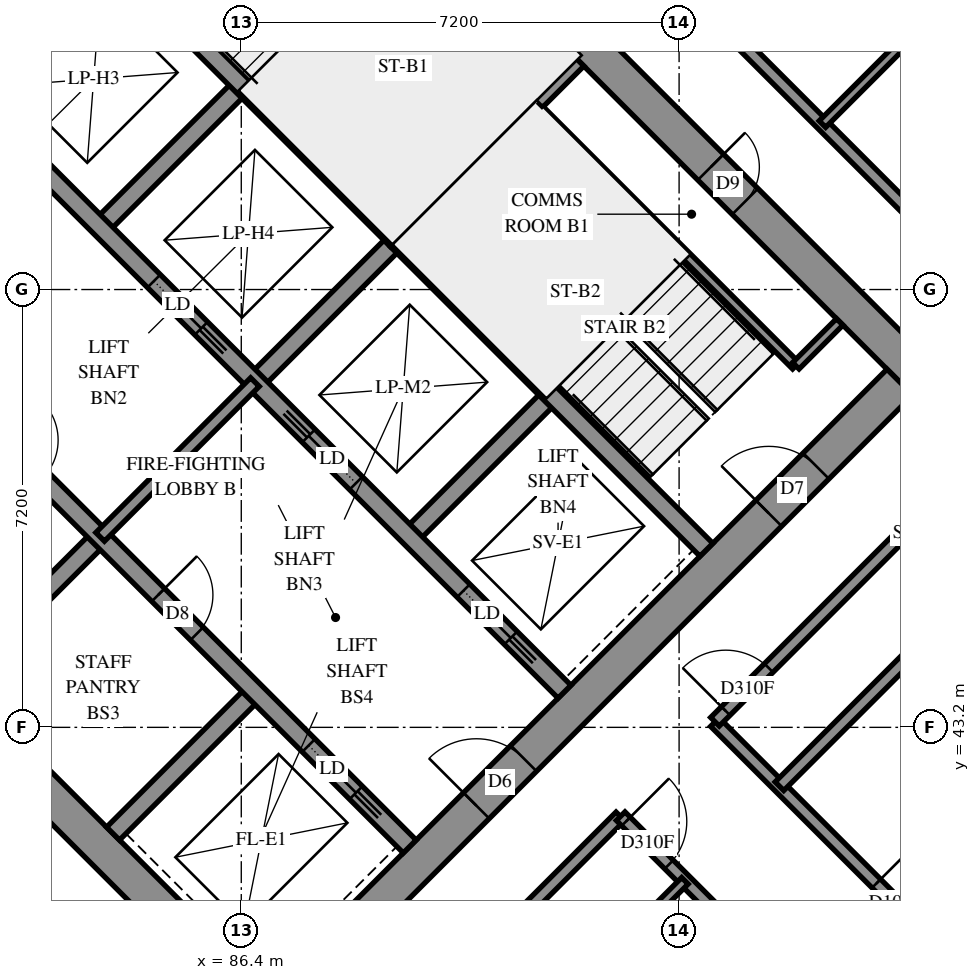
"""IFC4 building model, lengths in metres.
Left out: names, types, materials, properties, quantities, classifications, styles, units other than length and angle.
Written with IfcOpenShell. Run it as: python <this file> out.ifc"""

import sys

from ifc_helpers import new_model, si_unit, direction, frame, frame_2d, origin, place, context, subcontext, project, spatial, rectangle, extrude, element, fill, save


model = new_model("IFC4")
c1 = context("Model", 3, precision=1e-05, world=origin(), true_north=direction((0.0, 1.0)))
c2 = subcontext(c1, "Body", "Model", "MODEL_VIEW")
j1 = project(units=[si_unit("LENGTHUNIT", "METRE"), si_unit("PLANEANGLEUNIT", "RADIAN")], contexts=[c1])
p1 = place(None, origin())
s1 = spatial("IfcSite", under=j1, at=p1, CompositionType="ELEMENT")
p2 = place(p1, origin())
s2 = spatial("IfcBuilding", under=s1, at=p2, CompositionType="ELEMENT")
p3 = place(p2, frame((0.0, 0.0, 152.4)))
s3 = spatial("IfcBuildingStorey", under=s2, at=p3, CompositionType="ELEMENT", Elevation=152.4)
p4 = place(p3, frame((76.018, 49.302, -0.3), z_axis=(0.0, 0.0, 1.0), x_axis=(0.7071067812, -0.7071067812, 0.0)))
e1 = element("IfcWall", 1, at=p4, inside=s3, PredefinedType="SHEAR", context=c2, shape_type="SweptSolid", body=[
    extrude(rectangle(XDim=15.6, YDim=0.6, at=frame_2d((7.8, 0.0))), origin(), (0.0, 0.0, 1.0), 2.7),
])
p5 = place(p3, frame((86.625, 59.908, -0.3), z_axis=(0.0, 0.0, 1.0), x_axis=(0.7071067812, -0.7071067812, 0.0)))
e2 = element("IfcWall", 2, at=p5, inside=s3, PredefinedType="SHEAR", context=c2, shape_type="SweptSolid", body=[
    extrude(rectangle(XDim=15.6, YDim=0.6, at=frame_2d((7.8, 0.0))), origin(), (0.0, 0.0, 1.0), 2.7),
])
p6 = place(p5, frame((10.6, 0.0, 0.3)))
e3 = element("IfcOpeningElement", 3, at=p6, cuts=e2, PredefinedType="OPENING", context=c2, shape_type="SweptSolid", body=[
    extrude(rectangle(XDim=0.8, YDim=2.1, at=frame_2d((0.4, 1.05))), frame((0.0, 0.31, 0.0), z_axis=(0.0, -1.0, 0.0), x_axis=(1.0, 0.0, 0.0)), (0.0, 0.0, 1.0), 0.62),
])
p7 = place(p3, frame((76.442, 49.302, -0.3), z_axis=(0.0, 0.0, 1.0), x_axis=(0.7071067812, 0.7071067812, 0.0)))
e4 = element("IfcWall", 4, at=p7, inside=s3, PredefinedType="SHEAR", context=c2, shape_type="SweptSolid", body=[
    extrude(rectangle(XDim=14.4, YDim=0.6, at=frame_2d((7.2, 0.0))), origin(), (0.0, 0.0, 1.0), 2.7),
])
p8 = place(p7, frame((4.55, 0.0, 0.3)))
e5 = element("IfcOpeningElement", 5, at=p8, cuts=e4, PredefinedType="OPENING", context=c2, shape_type="SweptSolid", body=[
    extrude(rectangle(XDim=1.1, YDim=2.1, at=frame_2d((0.55, 1.05))), frame((0.0, 0.31, 0.0), z_axis=(0.0, -1.0, 0.0), x_axis=(1.0, 0.0, 0.0)), (0.0, 0.0, 1.0), 0.62),
])
p9 = place(p7, frame((11.35, 0.0, 0.3)))
e6 = element("IfcOpeningElement", 6, at=p9, cuts=e4, PredefinedType="OPENING", context=c2, shape_type="SweptSolid", body=[
    extrude(rectangle(XDim=1.1, YDim=2.1, at=frame_2d((0.55, 1.05))), frame((0.0, 0.31, 0.0), z_axis=(0.0, -1.0, 0.0), x_axis=(1.0, 0.0, 0.0)), (0.0, 0.0, 1.0), 0.62),
])
p10 = place(p3, frame((87.049, 38.695, -0.3), z_axis=(0.0, 0.0, 1.0), x_axis=(0.7071067812, 0.7071067812, 0.0)))
e7 = element("IfcWall", 7, at=p10, inside=s3, PredefinedType="SHEAR", context=c2, shape_type="SweptSolid", body=[
    extrude(rectangle(XDim=14.4, YDim=0.6, at=frame_2d((7.2, 0.0))), origin(), (0.0, 0.0, 1.0), 2.7),
])
p11 = place(p10, frame((4.55, 0.0, 0.3)))
e8 = element("IfcOpeningElement", 8, at=p11, cuts=e7, PredefinedType="OPENING", context=c2, shape_type="SweptSolid", body=[
    extrude(rectangle(XDim=1.1, YDim=2.1, at=frame_2d((0.55, 1.05))), frame((0.0, 0.31, 0.0), z_axis=(0.0, -1.0, 0.0), x_axis=(1.0, 0.0, 0.0)), (0.0, 0.0, 1.0), 0.62),
])
p12 = place(p10, frame((11.35, 0.0, 0.3)))
e9 = element("IfcOpeningElement", 9, at=p12, cuts=e7, PredefinedType="OPENING", context=c2, shape_type="SweptSolid", body=[
    extrude(rectangle(XDim=1.1, YDim=2.1, at=frame_2d((0.55, 1.05))), frame((0.0, 0.31, 0.0), z_axis=(0.0, -1.0, 0.0), x_axis=(1.0, 0.0, 0.0)), (0.0, 0.0, 1.0), 0.62),
])
p13 = place(p3, frame((84.079, 51.423, 0.0), z_axis=(0.0, 0.0, 1.0), x_axis=(0.7071219326, 0.7070916295, 0.0)))
e10 = element("IfcWall", 10, at=p13, inside=s3, PredefinedType="SOLIDWALL", context=c2, shape_type="SweptSolid", body=[
    extrude(rectangle(XDim=3.3, YDim=0.3, at=frame_2d((1.65, 0.0))), origin(), (0.0, 0.0, 1.0), 3.1),
])
p14 = place(p3, frame((81.746, 43.999, 0.0), z_axis=(0.0, 0.0, 1.0), x_axis=(0.7071067812, 0.7071067812, 0.0)))
e11 = element("IfcWall", 11, at=p14, inside=s3, PredefinedType="SOLIDWALL", context=c2, shape_type="SweptSolid", body=[
    extrude(rectangle(XDim=3.3, YDim=0.3, at=frame_2d((1.65, 0.0))), origin(), (0.0, 0.0, 1.0), 3.1),
])
p15 = place(p3, frame((86.625, 48.878, 0.0), z_axis=(0.0, 0.0, 1.0), x_axis=(0.7071067812, 0.7071067812, 0.0)))
e12 = element("IfcWall", 12, at=p15, inside=s3, PredefinedType="SOLIDWALL", context=c2, shape_type="SweptSolid", body=[
    extrude(rectangle(XDim=3.3, YDim=0.3, at=frame_2d((1.65, 0.0))), origin(), (0.0, 0.0, 1.0), 3.1),
])
p16 = place(p3, frame((84.291, 41.453, 0.0), z_axis=(0.0, 0.0, 1.0), x_axis=(0.7071067812, 0.7071067812, 0.0)))
e13 = element("IfcWall", 13, at=p16, inside=s3, PredefinedType="SOLIDWALL", context=c2, shape_type="SweptSolid", body=[
    extrude(rectangle(XDim=3.3, YDim=0.3, at=frame_2d((1.65, 0.0))), origin(), (0.0, 0.0, 1.0), 3.1),
])
p17 = place(p3, frame((89.17, 46.332, 0.0), z_axis=(0.0, 0.0, 1.0), x_axis=(0.7071067812, 0.7071067812, 0.0)))
e14 = element("IfcWall", 14, at=p17, inside=s3, PredefinedType="SOLIDWALL", context=c2, shape_type="SweptSolid", body=[
    extrude(rectangle(XDim=3.3, YDim=0.3, at=frame_2d((1.65, 0.0))), origin(), (0.0, 0.0, 1.0), 3.1),
])
p18 = place(p3, frame((78.988, 51.423, 0.0), z_axis=(0.0, 0.0, 1.0), x_axis=(0.7071067812, -0.7071067812, 0.0)))
e15 = element("IfcWall", 15, at=p18, inside=s3, PredefinedType="SOLIDWALL", context=c2, shape_type="SweptSolid", body=[
    extrude(rectangle(XDim=14.4, YDim=0.3, at=frame_2d((7.2, 0.0))), origin(), (0.0, 0.0, 1.0), 3.1),
])
p19 = place(p18, frame((1.35, 0.0, 0.0)))
e16 = element("IfcOpeningElement", 16, at=p19, cuts=e15, PredefinedType="OPENING", context=c2, shape_type="SweptSolid", body=[
    extrude(rectangle(XDim=0.9, YDim=2.1, at=frame_2d((0.45, 1.05))), frame((0.0, 0.16, 0.0), z_axis=(0.0, -1.0, 0.0), x_axis=(1.0, 0.0, 0.0)), (0.0, 0.0, 1.0), 0.32),
])
p20 = place(p18, frame((4.95, 0.0, 0.0)))
e17 = element("IfcOpeningElement", 17, at=p20, cuts=e15, PredefinedType="OPENING", context=c2, shape_type="SweptSolid", body=[
    extrude(rectangle(XDim=0.9, YDim=2.1, at=frame_2d((0.45, 1.05))), frame((0.0, 0.16, 0.0), z_axis=(0.0, -1.0, 0.0), x_axis=(1.0, 0.0, 0.0)), (0.0, 0.0, 1.0), 0.32),
])
p21 = place(p18, frame((8.55, 0.0, 0.0)))
e18 = element("IfcOpeningElement", 18, at=p21, cuts=e15, PredefinedType="OPENING", context=c2, shape_type="SweptSolid", body=[
    extrude(rectangle(XDim=0.9, YDim=2.1, at=frame_2d((0.45, 1.05))), frame((0.0, 0.16, 0.0), z_axis=(0.0, -1.0, 0.0), x_axis=(1.0, 0.0, 0.0)), (0.0, 0.0, 1.0), 0.32),
])
p22 = place(p18, frame((12.05, 0.0, 0.0)))
e19 = element("IfcOpeningElement", 19, at=p22, cuts=e15, PredefinedType="OPENING", context=c2, shape_type="SweptSolid", body=[
    extrude(rectangle(XDim=1.1, YDim=2.1, at=frame_2d((0.55, 1.05))), frame((0.0, 0.16, 0.0), z_axis=(0.0, -1.0, 0.0), x_axis=(1.0, 0.0, 0.0)), (0.0, 0.0, 1.0), 0.32),
])
p23 = place(p3, frame((81.534, 53.969, 0.0), z_axis=(0.0, 0.0, 1.0), x_axis=(0.707103309, -0.7071102534, 0.0)))
e20 = element("IfcWall", 20, at=p23, inside=s3, PredefinedType="SOLIDWALL", context=c2, shape_type="SweptSolid", body=[
    extrude(rectangle(XDim=14.4, YDim=0.3, at=frame_2d((7.2, 0.0))), origin(), (0.0, 0.0, 1.0), 3.1),
])
p24 = place(p23, frame((1.25, 0.0, 0.0)))
e21 = element("IfcOpeningElement", 21, at=p24, cuts=e20, PredefinedType="OPENING", context=c2, shape_type="SweptSolid", body=[
    extrude(rectangle(XDim=1.1, YDim=2.1, at=frame_2d((0.55, 1.05))), frame((0.0, 0.16, 0.0), z_axis=(0.0, -1.0, 0.0), x_axis=(1.0, 0.0, 0.0)), (0.0, 0.0, 1.0), 0.32),
])
p25 = place(p23, frame((4.85, 0.0, 0.0)))
e22 = element("IfcOpeningElement", 22, at=p25, cuts=e20, PredefinedType="OPENING", context=c2, shape_type="SweptSolid", body=[
    extrude(rectangle(XDim=1.1, YDim=2.1, at=frame_2d((0.55, 1.05))), frame((0.0, 0.16, 0.0), z_axis=(0.0, -1.0, 0.0), x_axis=(1.0, 0.0, 0.0)), (0.0, 0.0, 1.0), 0.32),
])
p26 = place(p23, frame((8.45, 0.0, 0.0)))
e23 = element("IfcOpeningElement", 23, at=p26, cuts=e20, PredefinedType="OPENING", context=c2, shape_type="SweptSolid", body=[
    extrude(rectangle(XDim=1.1, YDim=2.1, at=frame_2d((0.55, 1.05))), frame((0.0, 0.16, 0.0), z_axis=(0.0, -1.0, 0.0), x_axis=(1.0, 0.0, 0.0)), (0.0, 0.0, 1.0), 0.32),
])
p27 = place(p23, frame((12.05, 0.0, 0.0)))
e24 = element("IfcOpeningElement", 24, at=p27, cuts=e20, PredefinedType="OPENING", context=c2, shape_type="SweptSolid", body=[
    extrude(rectangle(XDim=1.1, YDim=2.1, at=frame_2d((0.55, 1.05))), frame((0.0, 0.16, 0.0), z_axis=(0.0, -1.0, 0.0), x_axis=(1.0, 0.0, 0.0)), (0.0, 0.0, 1.0), 0.32),
])
for number, where, z_axis, x_axis in (
    (25, (83.867, 56.302, 0.0), (0.0, 0.0, 1.0), (0.707, -0.707, 0.0)),
    (26, (88.958, 51.211, 0.0), (0.0, 0.0, 1.0), (0.707, -0.707, 0.0)),
):
    element("IfcWall", number, at=place(p3, frame(where, z_axis=z_axis, x_axis=x_axis)), inside=s3, PredefinedType="SOLIDWALL", context=c2, shape_type="SweptSolid", body=[
        extrude(rectangle(XDim=7.2, YDim=0.3, at=frame_2d((3.6, 0.0))), origin(), (0.0, 0.0, 1.0), 3.1),
    ])
p28 = place(p3, frame((88.958, 51.211, 0.0), z_axis=(0.0, 0.0, 1.0), x_axis=(0.7071067812, 0.7071067812, 0.0)))
e27 = element("IfcWall", 27, at=p28, inside=s3, PredefinedType="SOLIDWALL", context=c2, shape_type="SweptSolid", body=[
    extrude(rectangle(XDim=4.2, YDim=0.3, at=frame_2d((2.1, 0.0))), origin(), (0.0, 0.0, 1.0), 3.1),
])
p29 = place(p3, frame((91.313, 53.354, 0.0), z_axis=(0.0, 0.0, 1.0), x_axis=(0.7071067812, -0.7071067812, 0.0)))
e28 = element("IfcWall", 28, at=p29, inside=s3, PredefinedType="PARTITIONING", context=c2, shape_type="SweptSolid", body=[
    extrude(rectangle(XDim=5.95, YDim=0.15, at=frame_2d((2.975, 0.0))), origin(), (0.0, 0.0, 1.0), 3.1),
])
p30 = place(p3, frame((95.52, 49.146, 0.0), z_axis=(0.0, 0.0, 1.0), x_axis=(0.7071067812, 0.7071067812, 0.0)))
e29 = element("IfcWall", 29, at=p30, inside=s3, PredefinedType="PARTITIONING", context=c2, shape_type="SweptSolid", body=[
    extrude(rectangle(XDim=1.02, YDim=0.15, at=frame_2d((0.51, 0.0))), origin(), (0.0, 0.0, 1.0), 3.1),
])
p31 = place(p3, frame((84.079, 46.332, 0.0), z_axis=(0.0, 0.0, 1.0), x_axis=(0.7071067812, 0.7071067812, 0.0)))
e30 = element("IfcWall", 30, at=p31, inside=s3, PredefinedType="PARTITIONING", context=c2, shape_type="SweptSolid", body=[
    extrude(rectangle(XDim=3.6, YDim=0.2, at=frame_2d((1.8, 0.0))), origin(), (0.0, 0.0, 1.0), 3.1),
])
p32 = place(p3, frame((94.189, 43.287, 0.0), z_axis=(0.0, 0.0, 1.0), x_axis=(0.7071067812, -0.7071067812, 0.0)))
e31 = element("IfcWall", 31, at=p32, inside=s3, PredefinedType="PARTITIONING", context=c2, shape_type="SweptSolid", body=[
    extrude(rectangle(XDim=12.298, YDim=0.2, at=frame_2d((6.149, 0.0))), origin(), (0.0, 0.0, 1.0), 3.1),
])
p33 = place(p32, frame((3.755, 0.0, 0.0)))
e32 = element("IfcOpeningElement", 32, at=p33, cuts=e31, PredefinedType="OPENING", context=c2, shape_type="SweptSolid", body=[
    extrude(rectangle(XDim=0.9, YDim=2.1, at=frame_2d((0.45, 1.05))), frame((0.0, 0.11, 0.0), z_axis=(0.0, -1.0, 0.0), x_axis=(1.0, 0.0, 0.0)), (0.0, 0.0, 1.0), 0.22),
])
p34 = place(p32, frame((10.998, 0.0, 0.0)))
e33 = element("IfcOpeningElement", 33, at=p34, cuts=e31, PredefinedType="OPENING", context=c2, shape_type="SweptSolid", body=[
    extrude(rectangle(XDim=0.9, YDim=2.1, at=frame_2d((0.45, 1.05))), frame((0.0, 0.11, 0.0), z_axis=(0.0, -1.0, 0.0), x_axis=(1.0, 0.0, 0.0)), (0.0, 0.0, 1.0), 0.22),
])
p35 = place(p3, frame((91.755, 57.317, 0.0), z_axis=(0.0, 0.0, 1.0), x_axis=(0.7071067812, -0.7071067812, 0.0)))
e34 = element("IfcWall", 34, at=p35, inside=s3, PredefinedType="PARTITIONING", context=c2, shape_type="SweptSolid", body=[
    extrude(rectangle(XDim=11.639, YDim=0.2, at=frame_2d((5.819, 0.0))), origin(), (0.0, 0.0, 1.0), 3.1),
])
p36 = place(p3, frame((95.25, 42.232, 0.0), z_axis=(0.0, 0.0, 1.0), x_axis=(0.7071114163, 0.707102146, 0.0)))
e35 = element("IfcWall", 35, at=p36, inside=s3, PredefinedType="PARTITIONING", context=c2, shape_type="SweptSolid", body=[
    extrude(rectangle(XDim=10.787, YDim=0.2, at=frame_2d((5.394, 0.0))), origin(), (0.0, 0.0, 1.0), 3.1),
])
p37 = place(p3, frame((80.899, 41.869, 0.0), z_axis=(0.0, 0.0, 1.0), x_axis=(0.7071067812, -0.7071067812, 0.0)))
e36 = element("IfcWall", 36, at=p37, inside=s3, PredefinedType="PARTITIONING", context=c2, shape_type="SweptSolid", body=[
    extrude(rectangle(XDim=8.392, YDim=0.2, at=frame_2d((4.196, 0.0))), origin(), (0.0, 0.0, 1.0), 3.1),
])
p38 = place(p37, frame((4.988, 0.0, 0.0)))
e37 = element("IfcOpeningElement", 37, at=p38, cuts=e36, PredefinedType="OPENING", context=c2, shape_type="SweptSolid", body=[
    extrude(rectangle(XDim=0.9, YDim=2.1, at=frame_2d((0.45, 1.05))), frame((0.0, 0.11, 0.0), z_axis=(0.0, -1.0, 0.0), x_axis=(1.0, 0.0, 0.0)), (0.0, 0.0, 1.0), 0.22),
])
p39 = place(p3, frame((94.19, 43.292, 0.0), z_axis=(0.0, 0.0, 1.0), x_axis=(0.7071067812, 0.7071067812, 0.0)))
e38 = element("IfcWall", 38, at=p39, inside=s3, PredefinedType="PARTITIONING", context=c2, shape_type="SweptSolid", body=[
    extrude(rectangle(XDim=8.2, YDim=0.2, at=frame_2d((4.1, 0.0))), origin(), (0.0, 0.0, 1.0), 3.1),
])
p40 = place(p39, frame((0.251, 0.0, 0.0)))
e39 = element("IfcOpeningElement", 39, at=p40, cuts=e38, PredefinedType="OPENING", context=c2, shape_type="SweptSolid", body=[
    extrude(rectangle(XDim=1.0, YDim=2.1, at=frame_2d((0.5, 1.05))), frame((0.0, 0.11, 0.0), z_axis=(0.0, -1.0, 0.0), x_axis=(1.0, 0.0, 0.0)), (0.0, 0.0, 1.0), 0.22),
])
p41 = place(p3, frame((86.836, 35.938, 0.0), z_axis=(0.0, 0.0, 1.0), x_axis=(0.7071067812, 0.7071067812, 0.0)))
e40 = element("IfcWall", 40, at=p41, inside=s3, PredefinedType="PARTITIONING", context=c2, shape_type="SweptSolid", body=[
    extrude(rectangle(XDim=8.2, YDim=0.2, at=frame_2d((4.1, 0.0))), origin(), (0.0, 0.0, 1.0), 3.1),
])
p42 = place(p3, frame((92.639, 41.739, 0.0), z_axis=(0.0, 0.0, 1.0), x_axis=(0.7071067812, -0.7071067812, 0.0)))
e41 = element("IfcWall", 41, at=p42, inside=s3, PredefinedType="PARTITIONING", context=c2, shape_type="SweptSolid", body=[
    extrude(rectangle(XDim=5.1, YDim=0.2, at=frame_2d((2.55, 0.0))), origin(), (0.0, 0.0, 1.0), 3.1),
])
p43 = place(p42, frame((0.123, 0.0, 0.0)))
e42 = element("IfcOpeningElement", 42, at=p43, cuts=e41, PredefinedType="OPENING", context=c2, shape_type="SweptSolid", body=[
    extrude(rectangle(XDim=1.0, YDim=2.1, at=frame_2d((0.5, 1.05))), frame((0.0, 0.11, 0.0), z_axis=(0.0, -1.0, 0.0), x_axis=(1.0, 0.0, 0.0)), (0.0, 0.0, 1.0), 0.22),
])
p44 = place(p42, frame((3.734, 0.0, 0.0)))
e43 = element("IfcOpeningElement", 43, at=p44, cuts=e41, PredefinedType="OPENING", context=c2, shape_type="SweptSolid", body=[
    extrude(rectangle(XDim=0.9, YDim=2.1, at=frame_2d((0.45, 1.05))), frame((0.0, 0.11, 0.0), z_axis=(0.0, -1.0, 0.0), x_axis=(1.0, 0.0, 0.0)), (0.0, 0.0, 1.0), 0.22),
])
p45 = place(p3, frame((95.957, 53.121, 0.0), z_axis=(0.0, 0.0, 1.0), x_axis=(0.7071067812, 0.7071067812, 0.0)))
e44 = element("IfcWall", 44, at=p45, inside=s3, PredefinedType="PARTITIONING", context=c2, shape_type="SweptSolid", body=[
    extrude(rectangle(XDim=2.528, YDim=0.15, at=frame_2d((1.264, 0.0))), origin(), (0.0, 0.0, 1.0), 3.1),
])
p46 = place(p3, frame((91.997, 38.979, 0.0), z_axis=(0.0, 0.0, 1.0), x_axis=(0.7071067812, 0.7071067812, 0.0)))
e45 = element("IfcWall", 45, at=p46, inside=s3, PredefinedType="PARTITIONING", context=c2, shape_type="SweptSolid", body=[
    extrude(rectangle(XDim=2.401, YDim=0.15, at=frame_2d((1.201, 0.0))), origin(), (0.0, 0.0, 1.0), 3.1),
])
p47 = place(p6, origin())
e46 = element("IfcDoor", 46, at=p47, inside=s3, OperationType="SINGLE_SWING_RIGHT", PredefinedType="DOOR", context=c2, shape_type="SweptSolid", body=[
    extrude(rectangle(XDim=0.8, YDim=2.1, at=frame_2d((0.4, 1.05))), frame((0.0, 0.025, 0.0), z_axis=(0.0, -1.0, 0.0), x_axis=(1.0, 0.0, 0.0)), (0.0, 0.0, 1.0), 0.05),
])
fill(e3, e46)
p48 = place(p11, origin())
e47 = element("IfcDoor", 47, at=p48, inside=s3, OperationType="DOUBLE_DOOR_SINGLE_SWING", PredefinedType="DOOR", context=c2, shape_type="SweptSolid", body=[
    extrude(rectangle(XDim=1.1, YDim=2.1, at=frame_2d((0.55, 1.05))), frame((0.0, 0.025, 0.0), z_axis=(0.0, -1.0, 0.0), x_axis=(1.0, 0.0, 0.0)), (0.0, 0.0, 1.0), 0.05),
])
fill(e8, e47)
p49 = place(p12, origin())
e48 = element("IfcDoor", 48, at=p49, inside=s3, OperationType="SINGLE_SWING_RIGHT", PredefinedType="DOOR", context=c2, shape_type="SweptSolid", body=[
    extrude(rectangle(XDim=1.1, YDim=2.1, at=frame_2d((0.55, 1.05))), frame((0.0, 0.025, 0.0), z_axis=(0.0, -1.0, 0.0), x_axis=(1.0, 0.0, 0.0)), (0.0, 0.0, 1.0), 0.05),
])
fill(e9, e48)
p50 = place(p21, origin())
e49 = element("IfcDoor", 49, at=p50, inside=s3, OperationType="SINGLE_SWING_LEFT", PredefinedType="DOOR", context=c2, shape_type="SweptSolid", body=[
    extrude(rectangle(XDim=0.9, YDim=2.1, at=frame_2d((0.45, 1.05))), frame((0.0, 0.025, 0.0), z_axis=(0.0, -1.0, 0.0), x_axis=(1.0, 0.0, 0.0)), (0.0, 0.0, 1.0), 0.05),
])
fill(e18, e49)
p51 = place(p22, origin())
e50 = element("IfcDoor", 50, at=p51, inside=s3, OperationType="SLIDING_TO_RIGHT", PredefinedType="DOOR", context=c2, shape_type="SweptSolid", body=[
    extrude(rectangle(XDim=1.1, YDim=2.1, at=frame_2d((0.55, 1.05))), frame((0.0, 0.025, 0.0), z_axis=(0.0, -1.0, 0.0), x_axis=(1.0, 0.0, 0.0)), (0.0, 0.0, 1.0), 0.05),
])
fill(e19, e50)
p52 = place(p25, origin())
e51 = element("IfcDoor", 51, at=p52, inside=s3, OperationType="SLIDING_TO_RIGHT", PredefinedType="DOOR", context=c2, shape_type="SweptSolid", body=[
    extrude(rectangle(XDim=1.1, YDim=2.1, at=frame_2d((0.55, 1.05))), frame((0.0, 0.025, 0.0), z_axis=(0.0, -1.0, 0.0), x_axis=(1.0, 0.0, 0.0)), (0.0, 0.0, 1.0), 0.05),
])
fill(e22, e51)
p53 = place(p26, origin())
e52 = element("IfcDoor", 52, at=p53, inside=s3, OperationType="SLIDING_TO_LEFT", PredefinedType="DOOR", context=c2, shape_type="SweptSolid", body=[
    extrude(rectangle(XDim=1.1, YDim=2.1, at=frame_2d((0.55, 1.05))), frame((0.0, 0.025, 0.0), z_axis=(0.0, -1.0, 0.0), x_axis=(1.0, 0.0, 0.0)), (0.0, 0.0, 1.0), 0.05),
])
fill(e23, e52)
p54 = place(p27, origin())
e53 = element("IfcDoor", 53, at=p54, inside=s3, OperationType="SLIDING_TO_RIGHT", PredefinedType="DOOR", context=c2, shape_type="SweptSolid", body=[
    extrude(rectangle(XDim=1.1, YDim=2.1, at=frame_2d((0.55, 1.05))), frame((0.0, 0.025, 0.0), z_axis=(0.0, -1.0, 0.0), x_axis=(1.0, 0.0, 0.0)), (0.0, 0.0, 1.0), 0.05),
])
fill(e24, e53)
p55 = place(p40, origin())
e54 = element("IfcDoor", 54, at=p55, inside=s3, OperationType="SINGLE_SWING_RIGHT", PredefinedType="DOOR", context=c2, shape_type="SweptSolid", body=[
    extrude(rectangle(XDim=1.0, YDim=2.1, at=frame_2d((0.5, 1.05))), frame((0.0, 0.025, 0.0), z_axis=(0.0, -1.0, 0.0), x_axis=(1.0, 0.0, 0.0)), (0.0, 0.0, 1.0), 0.05),
])
fill(e39, e54)
p56 = place(p33, origin())
e55 = element("IfcDoor", 55, at=p56, inside=s3, OperationType="SINGLE_SWING_RIGHT", PredefinedType="DOOR", context=c2, shape_type="SweptSolid", body=[
    extrude(rectangle(XDim=0.9, YDim=2.1, at=frame_2d((0.45, 1.05))), frame((0.0, 0.025, 0.0), z_axis=(0.0, -1.0, 0.0), x_axis=(1.0, 0.0, 0.0)), (0.0, 0.0, 1.0), 0.05),
])
fill(e32, e55)
p57 = place(p43, origin())
e56 = element("IfcDoor", 56, at=p57, inside=s3, OperationType="SINGLE_SWING_RIGHT", PredefinedType="DOOR", context=c2, shape_type="SweptSolid", body=[
    extrude(rectangle(XDim=1.0, YDim=2.1, at=frame_2d((0.5, 1.05))), frame((0.0, 0.025, 0.0), z_axis=(0.0, -1.0, 0.0), x_axis=(1.0, 0.0, 0.0)), (0.0, 0.0, 1.0), 0.05),
])
fill(e42, e56)
save(model, sys.argv[1])
